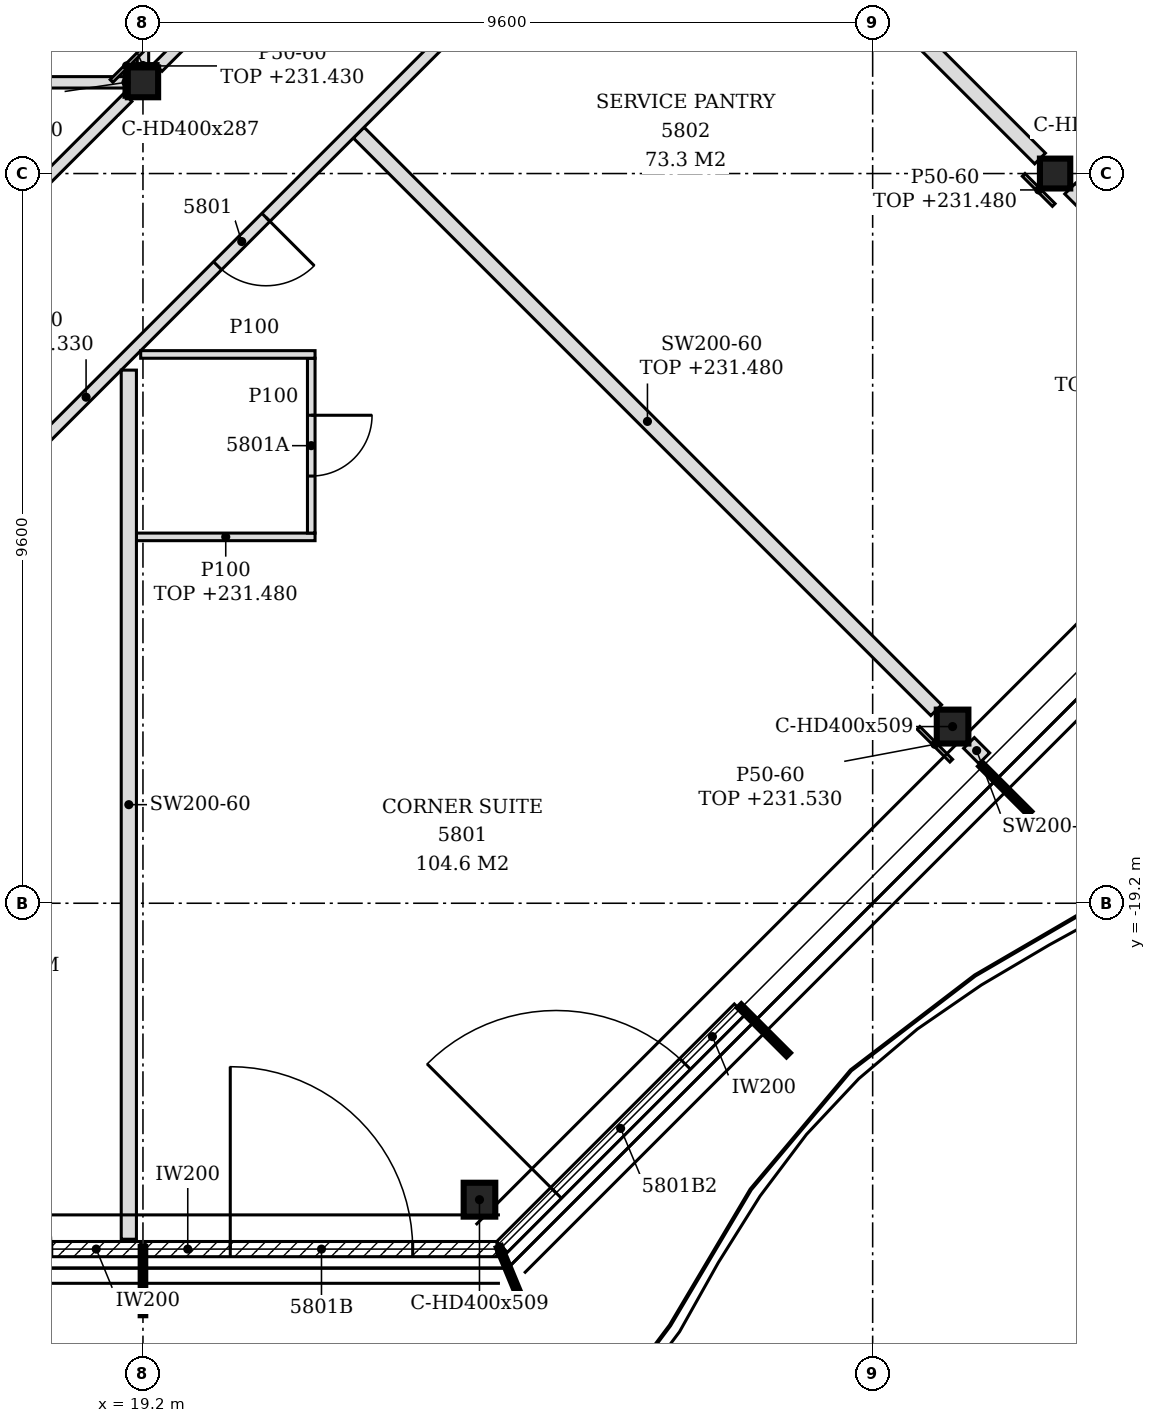
"""IFC4 building model, lengths in metres.
Left out: names, types, materials, properties, quantities, classifications, styles, units other than length and angle.
Written with IfcOpenShell. Run it as: python <this file> out.ifc"""

import sys

from ifc_helpers import new_model, si_unit, direction, frame, frame_2d, origin, origin_2d, place, context, subcontext, project, spatial, polyline, rectangle, i_section, outline, extrude, element, fill, save


model = new_model("IFC4")
c1 = context("Model", 3, precision=1e-05, world=origin(), true_north=direction((0.0, 1.0)))
c2 = subcontext(c1, "Body", "Model", "MODEL_VIEW")
j1 = project(units=[si_unit("LENGTHUNIT", "METRE"), si_unit("PLANEANGLEUNIT", "RADIAN")], contexts=[c1])
p1 = place(None, origin())
s1 = spatial("IfcSite", under=j1, at=p1, CompositionType="ELEMENT")
p2 = place(p1, origin())
s2 = spatial("IfcBuilding", under=s1, at=p2, CompositionType="ELEMENT")
p3 = place(p2, frame((0.0, 0.0, 228.6)))
s3 = spatial("IfcBuildingStorey", under=s2, at=p3, CompositionType="ELEMENT", Elevation=228.6)
for number, where, z_axis, x_axis in (
    (1, (23.627, -23.1, -0.15), (0.0, 0.0, 1.0), (1.0, 0.0, 0.0)),
    (2, (29.852, -16.876, -0.15), (0.0, 0.0, 1.0), (1.0, 0.0, 0.0)),
):
    element("IfcColumn", number, at=place(p3, frame(where, z_axis=z_axis, x_axis=x_axis)), inside=s3, PredefinedType="COLUMN", context=c2, shape_type="SweptSolid", body=[
        extrude(i_section(OverallWidth=0.416, OverallDepth=0.446, WebThickness=0.039, FlangeThickness=0.063, FilletRadius=0.015, at=origin_2d()), origin(), (0.0, 0.0, 1.0), 3.6),
    ])
for number, where, z_axis, x_axis in (
    (3, (19.2, -8.4, -0.15), (0.0, 0.0, 1.0), (1.0, 0.0, 0.0)),
    (4, (31.2, -9.6, -0.15), (0.0, 0.0, 1.0), (1.0, 0.0, 0.0)),
):
    element("IfcColumn", number, at=place(p3, frame(where, z_axis=z_axis, x_axis=x_axis)), inside=s3, PredefinedType="COLUMN", context=c2, shape_type="SweptSolid", body=[
        extrude(i_section(OverallWidth=0.399, OverallDepth=0.393, WebThickness=0.023, FlangeThickness=0.037, FilletRadius=0.015, at=origin_2d()), origin(), (0.0, 0.0, 1.0), 3.6),
    ])
p4 = place(p3, frame((14.43, -23.75, 0.0), z_axis=(0.0, 0.0, 1.0), x_axis=(1.0, 0.0, 0.0)))
e5 = element("IfcWall", 5, at=p4, inside=s3, PredefinedType="NOTDEFINED", context=c2, shape_type="SweptSolid", body=[
    extrude(rectangle(XDim=4.74, YDim=0.2, at=frame_2d((2.37, 0.0))), origin(), (0.0, 0.0, 1.0), 3.45),
])
p5 = place(p4, frame((1.17, 0.0, 0.0)))
e6 = element("IfcOpeningElement", 6, at=p5, cuts=e5, PredefinedType="OPENING", context=c2, shape_type="SweptSolid", body=[
    extrude(rectangle(XDim=2.4, YDim=2.4, at=frame_2d((1.2, 1.2))), frame((0.0, 0.11, 0.0), z_axis=(0.0, -1.0, 0.0), x_axis=(1.0, 0.0, 0.0)), (0.0, 0.0, 1.0), 0.22),
])
p6 = place(p3, frame((19.23, -23.75, 0.0), z_axis=(0.0, 0.0, 1.0), x_axis=(1.0, 0.0, 0.0)))
e7 = element("IfcWall", 7, at=p6, inside=s3, PredefinedType="NOTDEFINED", context=c2, shape_type="SweptSolid", body=[
    extrude(rectangle(XDim=4.626, YDim=0.2, at=frame_2d((2.313, 0.0))), origin(), (0.0, 0.0, 1.0), 3.45),
])
p7 = place(p6, frame((1.119, 0.0, 0.0)))
e8 = element("IfcOpeningElement", 8, at=p7, cuts=e7, PredefinedType="OPENING", context=c2, shape_type="SweptSolid", body=[
    extrude(rectangle(XDim=2.4, YDim=2.4, at=frame_2d((1.2, 1.2))), frame((0.0, 0.11, 0.0), z_axis=(0.0, -1.0, 0.0), x_axis=(1.0, 0.0, 0.0)), (0.0, 0.0, 1.0), 0.22),
])
p8 = place(p3, frame((23.925, -23.722, 0.0), z_axis=(0.0, 0.0, 1.0), x_axis=(0.707106781187, 0.707106781187, 0.0)))
e9 = element("IfcWall", 9, at=p8, inside=s3, PredefinedType="NOTDEFINED", context=c2, shape_type="SweptSolid", body=[
    extrude(rectangle(XDim=4.421, YDim=0.2, at=frame_2d((2.21, 0.0))), origin(), (0.0, 0.0, 1.0), 3.45),
])
p9 = place(p8, frame((1.005, 0.0, 0.0)))
e10 = element("IfcOpeningElement", 10, at=p9, cuts=e9, PredefinedType="OPENING", context=c2, shape_type="SweptSolid", body=[
    extrude(rectangle(XDim=2.4, YDim=2.4, at=frame_2d((1.2, 1.2))), frame((0.0, 0.11, 0.0), z_axis=(0.0, -1.0, 0.0), x_axis=(1.0, 0.0, 0.0)), (0.0, 0.0, 1.0), 0.22),
])
p10 = place(p3, frame((19.014, -23.62, 0.0), z_axis=(0.0, 0.0, 1.0), x_axis=(0.0, 1.0, 0.0)))
e11 = element("IfcWall", 11, at=p10, inside=s3, PredefinedType="PARTITIONING", context=c2, shape_type="SweptSolid", body=[
    extrude(outline(polyline([(0.0, 0.0), (11.434, 0.0), (11.434, 2.73), (0.64, 2.73), (0.638, 2.93), (0.37, 2.93), (0.368, 3.45), (0.0, 3.45), (0.0, 0.0)])), frame((0.0, 0.1, 0.0), z_axis=(0.0, -1.0, 0.0), x_axis=(1.0, 0.0, 0.0)), (0.0, 0.0, 1.0), 0.2),
])
p11 = place(p3, frame((30.269, -17.293, 0.0), z_axis=(0.0, 0.0, 1.0), x_axis=(-0.707106781187, 0.707106781187, 0.0)))
e12 = element("IfcWall", 12, at=p11, inside=s3, PredefinedType="PARTITIONING", context=c2, shape_type="SweptSolid", body=[
    extrude(rectangle(XDim=0.285, YDim=0.2, at=frame_2d((0.143, 0.0))), origin(), (0.0, 0.0, 1.0), 3.45),
])
p12 = place(p3, frame((29.636, -16.66, 0.0), z_axis=(0.0, 0.0, 1.0), x_axis=(-0.707095420673, 0.707118141518, 0.0)))
e13 = element("IfcWall", 13, at=p12, inside=s3, PredefinedType="PARTITIONING", context=c2, shape_type="SweptSolid", body=[
    extrude(rectangle(XDim=10.745, YDim=0.2, at=frame_2d((5.373, 0.0))), origin(), (0.0, 0.0, 1.0), 2.88),
])
p13 = place(p3, frame((19.114, -14.38, 0.0), z_axis=(0.0, 0.0, 1.0), x_axis=(1.0, 0.0, 0.0)))
e14 = element("IfcWall", 14, at=p13, inside=s3, PredefinedType="PARTITIONING", context=c2, shape_type="SweptSolid", body=[
    extrude(outline(polyline([(0.0, 0.0), (2.35, 0.0), (2.35, 2.88), (0.236, 2.88), (0.234, 2.73), (0.0, 2.73), (0.0, 0.0)])), frame((0.0, 0.05, 0.0), z_axis=(0.0, -1.0, 0.0), x_axis=(1.0, 0.0, 0.0)), (0.0, 0.0, 1.0), 0.1),
])
p14 = place(p3, frame((16.722, -14.272, 0.0), z_axis=(0.0, 0.0, 1.0), x_axis=(0.707106781187, 0.707106781187, 0.0)))
e15 = element("IfcWall", 15, at=p14, inside=s3, PredefinedType="PARTITIONING", context=c2, shape_type="SweptSolid", body=[
    extrude(rectangle(XDim=20.049, YDim=0.15, at=frame_2d((10.025, 0.0))), origin(), (0.0, 0.0, 1.0), 2.73),
])
p15 = place(p14, frame((4.892, 0.0, 0.0)))
e16 = element("IfcOpeningElement", 16, at=p15, cuts=e15, PredefinedType="OPENING", context=c2, shape_type="SweptSolid", body=[
    extrude(rectangle(XDim=0.9, YDim=2.1, at=frame_2d((0.45, 1.05))), frame((0.0, 0.085, 0.0), z_axis=(0.0, -1.0, 0.0), x_axis=(1.0, 0.0, 0.0)), (0.0, 0.0, 1.0), 0.17),
])
p16 = place(p14, frame((10.042, 0.0, 0.0)))
e17 = element("IfcOpeningElement", 17, at=p16, cuts=e15, PredefinedType="OPENING", context=c2, shape_type="SweptSolid", body=[
    extrude(rectangle(XDim=0.9, YDim=2.1, at=frame_2d((0.45, 1.05))), frame((0.0, 0.085, 0.0), z_axis=(0.0, -1.0, 0.0), x_axis=(1.0, 0.0, 0.0)), (0.0, 0.0, 1.0), 0.17),
])
p17 = place(p14, frame((14.443, 0.0, 0.0)))
e18 = element("IfcOpeningElement", 18, at=p17, cuts=e15, PredefinedType="OPENING", context=c2, shape_type="SweptSolid", body=[
    extrude(rectangle(XDim=0.9, YDim=2.1, at=frame_2d((0.45, 1.05))), frame((0.0, 0.085, 0.0), z_axis=(0.0, -1.0, 0.0), x_axis=(1.0, 0.0, 0.0)), (0.0, 0.0, 1.0), 0.17),
])
p18 = place(p14, frame((17.837, 0.0, 0.0)))
e19 = element("IfcOpeningElement", 19, at=p18, cuts=e15, PredefinedType="OPENING", context=c2, shape_type="SweptSolid", body=[
    extrude(rectangle(XDim=0.9, YDim=2.1, at=frame_2d((0.45, 1.05))), frame((0.0, 0.085, 0.0), z_axis=(0.0, -1.0, 0.0), x_axis=(1.0, 0.0, 0.0)), (0.0, 0.0, 1.0), 0.17),
])
p19 = place(p3, frame((21.414, -14.33, 0.0), z_axis=(0.0, 0.0, 1.0), x_axis=(0.0, 1.0, 0.0)))
e20 = element("IfcWall", 20, at=p19, inside=s3, PredefinedType="PARTITIONING", context=c2, shape_type="SweptSolid", body=[
    extrude(outline(polyline([(0.0, 0.0), (2.3, 0.0), (2.3, 3.45), (0.035, 3.45), (0.033, 2.88), (0.0, 2.88), (0.0, 0.0)])), frame((0.0, 0.05, 0.0), z_axis=(0.0, -1.0, 0.0), x_axis=(1.0, 0.0, 0.0)), (0.0, 0.0, 1.0), 0.1),
])
p20 = place(p19, frame((0.75, 0.0, 0.0)))
e21 = element("IfcOpeningElement", 21, at=p20, cuts=e20, PredefinedType="OPENING", context=c2, shape_type="SweptSolid", body=[
    extrude(rectangle(XDim=0.8, YDim=2.1, at=frame_2d((0.4, 1.05))), frame((0.0, 0.06, 0.0), z_axis=(0.0, -1.0, 0.0), x_axis=(1.0, 0.0, 0.0)), (0.0, 0.0, 1.0), 0.12),
])
p21 = place(p3, frame((34.581, -12.981, 0.0), z_axis=(0.0, 0.0, 1.0), x_axis=(-0.707133900936, 0.707079660397, 0.0)))
e22 = element("IfcWall", 22, at=p21, inside=s3, PredefinedType="PARTITIONING", context=c2, shape_type="SweptSolid", body=[
    extrude(rectangle(XDim=4.501, YDim=0.2, at=frame_2d((2.25, 0.0))), origin(), (0.0, 0.0, 1.0), 2.63),
])
p22 = place(p3, frame((19.17, -11.98, 0.0), z_axis=(0.0, 0.0, 1.0), x_axis=(1.0, 0.0, 0.0)))
e23 = element("IfcWall", 23, at=p22, inside=s3, PredefinedType="PARTITIONING", context=c2, shape_type="SweptSolid", body=[
    extrude(outline(polyline([(0.0, 0.0), (2.294, 0.0), (2.294, 3.45), (0.18, 3.45), (0.178, 2.73), (0.0, 2.73), (0.0, 0.0)])), frame((0.0, 0.05, 0.0), z_axis=(0.0, -1.0, 0.0), x_axis=(1.0, 0.0, 0.0)), (0.0, 0.0, 1.0), 0.1),
])
p23 = place(p3, frame((15.728, -11.872, 0.0), z_axis=(0.0, 0.0, 1.0), x_axis=(0.707080416772, 0.707133144618, 0.0)))
e24 = element("IfcWall", 24, at=p23, inside=s3, PredefinedType="PARTITIONING", context=c2, shape_type="SweptSolid", body=[
    extrude(rectangle(XDim=4.63, YDim=0.15, at=frame_2d((2.315, 0.0))), origin(), (0.0, 0.0, 1.0), 3.45),
])
p24 = place(p3, frame((35.86, -10.436, 0.0), z_axis=(0.0, 0.0, 1.0), x_axis=(-0.707106781187, 0.707106781187, 0.0)))
e25 = element("IfcWall", 25, at=p24, inside=s3, PredefinedType="PARTITIONING", context=c2, shape_type="SweptSolid", body=[
    extrude(rectangle(XDim=10.745, YDim=0.2, at=frame_2d((5.373, 0.0))), origin(), (0.0, 0.0, 1.0), 2.88),
])
p25 = place(p3, frame((31.002, -9.402, 0.0), z_axis=(0.0, 0.0, 1.0), x_axis=(-0.707088226093, 0.707125335793, 0.0)))
e26 = element("IfcWall", 26, at=p25, inside=s3, PredefinedType="PARTITIONING", context=c2, shape_type="SweptSolid", body=[
    extrude(rectangle(XDim=6.579, YDim=0.2, at=frame_2d((3.29, 0.0))), origin(), (0.0, 0.0, 1.0), 2.88),
])
p26 = place(p3, frame((7.399, -8.4, 0.0), z_axis=(0.0, 0.0, 1.0), x_axis=(1.0, 0.0, 0.0)))
e27 = element("IfcWall", 27, at=p26, inside=s3, PredefinedType="PARTITIONING", context=c2, shape_type="SweptSolid", body=[
    extrude(rectangle(XDim=11.601, YDim=0.15, at=frame_2d((5.801, 0.0))), origin(), (0.0, 0.0, 1.0), 2.83),
])
p27 = place(p26, frame((5.351, 0.0, 0.0)))
e28 = element("IfcOpeningElement", 28, at=p27, cuts=e27, PredefinedType="OPENING", context=c2, shape_type="SweptSolid", body=[
    extrude(rectangle(XDim=0.9, YDim=2.1, at=frame_2d((0.45, 1.05))), frame((0.0, 0.085, 0.0), z_axis=(0.0, -1.0, 0.0), x_axis=(1.0, 0.0, 0.0)), (0.0, 0.0, 1.0), 0.17),
])
p28 = place(p3, frame((19.2, -8.204, 0.0), z_axis=(0.0, 0.0, 1.0), x_axis=(0.0, 1.0, 0.0)))
e29 = element("IfcWall", 29, at=p28, inside=s3, PredefinedType="PARTITIONING", context=c2, shape_type="SweptSolid", body=[
    extrude(rectangle(XDim=9.329, YDim=0.15, at=frame_2d((4.664, 0.0))), origin(), (0.0, 0.0, 1.0), 2.83),
])
p29 = place(p28, frame((7.354, 0.0, 0.0)))
e30 = element("IfcOpeningElement", 30, at=p29, cuts=e29, PredefinedType="OPENING", context=c2, shape_type="SweptSolid", body=[
    extrude(rectangle(XDim=0.8, YDim=2.1, at=frame_2d((0.4, 1.05))), frame((0.0, 0.085, 0.0), z_axis=(0.0, -1.0, 0.0), x_axis=(1.0, 0.0, 0.0)), (0.0, 0.0, 1.0), 0.17),
])
p30 = place(p28, frame((4.503, 0.0, 0.0)))
e31 = element("IfcOpeningElement", 31, at=p30, cuts=e29, PredefinedType="OPENING", context=c2, shape_type="SweptSolid", body=[
    extrude(rectangle(XDim=0.8, YDim=2.1, at=frame_2d((0.4, 1.05))), frame((0.0, 0.085, 0.0), z_axis=(0.0, -1.0, 0.0), x_axis=(1.0, 0.0, 0.0)), (0.0, 0.0, 1.0), 0.17),
])
p31 = place(p3, frame((19.398, -8.202, 0.0), z_axis=(0.0, 0.0, 1.0), x_axis=(0.707116088468, 0.707097473782, 0.0)))
e32 = element("IfcWall", 32, at=p31, inside=s3, PredefinedType="PARTITIONING", context=c2, shape_type="SweptSolid", body=[
    extrude(rectangle(XDim=13.115, YDim=0.15, at=frame_2d((6.558, 0.0))), origin(), (0.0, 0.0, 1.0), 2.88),
])
p32 = place(p31, frame((6.058, 0.0, 0.0)))
e33 = element("IfcOpeningElement", 33, at=p32, cuts=e32, PredefinedType="OPENING", context=c2, shape_type="SweptSolid", body=[
    extrude(rectangle(XDim=0.9, YDim=2.1, at=frame_2d((0.45, 1.05))), frame((0.0, 0.085, 0.0), z_axis=(0.0, -1.0, 0.0), x_axis=(1.0, 0.0, 0.0)), (0.0, 0.0, 1.0), 0.17),
])
p33 = place(p3, frame((39.331, -8.131, 0.0), z_axis=(0.0, 0.0, 1.0), x_axis=(-0.707106781187, 0.707106781187, 0.0)))
e34 = element("IfcWall", 34, at=p33, inside=s3, PredefinedType="PARTITIONING", context=c2, shape_type="SweptSolid", body=[
    extrude(rectangle(XDim=11.219, YDim=0.2, at=frame_2d((5.61, 0.0))), origin(), (0.0, 0.0, 1.0), 2.93),
])
p34 = place(p3, frame((29.834, -17.324, 0.0), z_axis=(0.0, 0.0, 1.0), x_axis=(-0.706906496032, 0.707307009627, 0.0)))
e35 = element("IfcWall", 35, at=p34, inside=s3, PredefinedType="PARTITIONING", context=c2, shape_type="SweptSolid", body=[
    extrude(rectangle(XDim=0.61, YDim=0.05, at=frame_2d((0.305, 0.0))), origin(), (0.0, 0.0, 1.0), 2.93),
])
p35 = place(p3, frame((31.182, -10.014, 0.0), z_axis=(0.0, 0.0, 1.0), x_axis=(-0.707106781187, 0.707106781187, 0.0)))
e36 = element("IfcWall", 36, at=p35, inside=s3, PredefinedType="PARTITIONING", context=c2, shape_type="SweptSolid", body=[
    extrude(rectangle(XDim=0.56, YDim=0.05, at=frame_2d((0.28, 0.0))), origin(), (0.0, 0.0, 1.0), 2.88),
])
p36 = place(p3, frame((18.786, -8.382, 0.0), z_axis=(0.0, 0.0, 1.0), x_axis=(0.707106781187, 0.707106781187, 0.0)))
e37 = element("IfcWall", 37, at=p36, inside=s3, PredefinedType="PARTITIONING", context=c2, shape_type="SweptSolid", body=[
    extrude(rectangle(XDim=0.56, YDim=0.05, at=frame_2d((0.28, 0.0))), origin(), (0.0, 0.0, 1.0), 2.83),
])
p37 = place(p3, frame((19.0, -8.178, 0.0), z_axis=(0.0, 0.0, 1.0), x_axis=(1.0, 0.0, 0.0)))
e38 = element("IfcWall", 38, at=p37, inside=s3, PredefinedType="PARTITIONING", context=c2, shape_type="SweptSolid", body=[
    extrude(rectangle(XDim=0.399, YDim=0.05, at=frame_2d((0.199, 0.0))), origin(), (0.0, 0.0, 1.0), 2.83),
])
p38 = place(p3, frame((18.976, -8.596, 0.0), z_axis=(0.0, 0.0, 1.0), x_axis=(0.0, 1.0, 0.0)))
e39 = element("IfcWall", 39, at=p38, inside=s3, PredefinedType="PARTITIONING", context=c2, shape_type="SweptSolid", body=[
    extrude(rectangle(XDim=0.393, YDim=0.05, at=frame_2d((0.196, 0.0))), origin(), (0.0, 0.0, 1.0), 2.83),
])
p39 = place(p7, origin())
e40 = element("IfcDoor", 40, at=p39, inside=s3, OperationType="SINGLE_SWING_LEFT", PredefinedType="DOOR", context=c2, shape_type="SweptSolid", body=[
    extrude(rectangle(XDim=2.4, YDim=2.4, at=frame_2d((1.2, 1.2))), frame((0.0, 0.025, 0.0), z_axis=(0.0, -1.0, 0.0), x_axis=(1.0, 0.0, 0.0)), (0.0, 0.0, 1.0), 0.05),
])
fill(e8, e40)
p40 = place(p9, origin())
e41 = element("IfcDoor", 41, at=p40, inside=s3, OperationType="SINGLE_SWING_LEFT", PredefinedType="DOOR", context=c2, shape_type="SweptSolid", body=[
    extrude(rectangle(XDim=2.4, YDim=2.4, at=frame_2d((1.2, 1.2))), frame((0.0, 0.025, 0.0), z_axis=(0.0, -1.0, 0.0), x_axis=(1.0, 0.0, 0.0)), (0.0, 0.0, 1.0), 0.05),
])
fill(e10, e41)
p41 = place(p15, frame((0.9, 0.0, 0.0), z_axis=(0.0, 0.0, 1.0), x_axis=(-1.0, 0.0, 0.0)))
e42 = element("IfcDoor", 42, at=p41, inside=s3, OperationType="SINGLE_SWING_LEFT", PredefinedType="DOOR", context=c2, shape_type="SweptSolid", body=[
    extrude(rectangle(XDim=0.9, YDim=2.1, at=frame_2d((0.45, 1.05))), frame((0.0, 0.025, 0.0), z_axis=(0.0, -1.0, 0.0), x_axis=(1.0, 0.0, 0.0)), (0.0, 0.0, 1.0), 0.05),
])
fill(e16, e42)
p42 = place(p20, frame((0.8, 0.0, 0.0), z_axis=(0.0, 0.0, 1.0), x_axis=(-1.0, 0.0, 0.0)))
e43 = element("IfcDoor", 43, at=p42, inside=s3, OperationType="SINGLE_SWING_LEFT", PredefinedType="DOOR", context=c2, shape_type="SweptSolid", body=[
    extrude(rectangle(XDim=0.8, YDim=2.1, at=frame_2d((0.4, 1.05))), frame((0.0, 0.025, 0.0), z_axis=(0.0, -1.0, 0.0), x_axis=(1.0, 0.0, 0.0)), (0.0, 0.0, 1.0), 0.05),
])
fill(e21, e43)
save(model, sys.argv[1])
